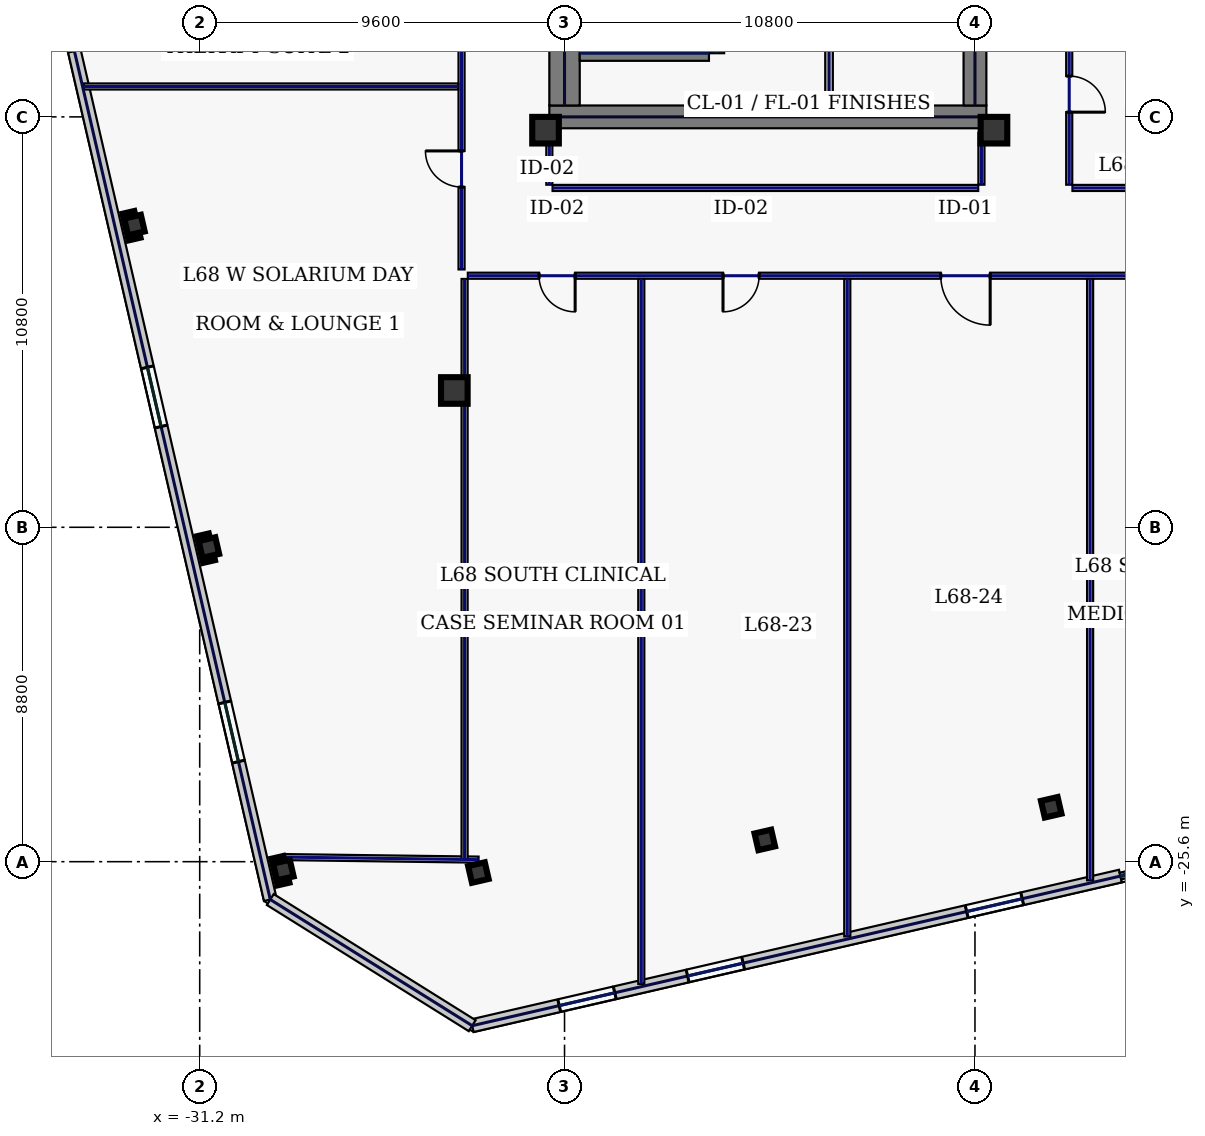
"""IFC4 building model, lengths in metres.
Left out: names, types, materials, properties, quantities, classifications, styles, units other than length and angle.
Written with IfcOpenShell. Run it as: python <this file> out.ifc"""

import sys

from ifc_helpers import new_model, si_unit, direction, frame, frame_2d, origin, origin_2d, place, context, subcontext, project, spatial, rectangle, hollow_rectangle, extrude, element, fill, save


model = new_model("IFC4")
c1 = context("Model", 3, precision=1e-05, world=origin(), true_north=direction((0.0, 1.0)))
c2 = subcontext(c1, "Body", "Model", "MODEL_VIEW")
j1 = project(units=[si_unit("LENGTHUNIT", "METRE"), si_unit("PLANEANGLEUNIT", "RADIAN")], contexts=[c1])
p1 = place(None, origin())
s1 = spatial("IfcSite", under=j1, at=p1, CompositionType="ELEMENT")
p2 = place(p1, origin())
s2 = spatial("IfcBuilding", under=s1, at=p2, CompositionType="ELEMENT")
p3 = place(p2, frame((0.0, 0.0, 293.0)))
s3 = spatial("IfcBuildingStorey", under=s2, at=p3, CompositionType="ELEMENT", Elevation=293.0)
p4 = place(p3, frame((-22.0, -6.0, 0.0), z_axis=(0.0, 0.0, 1.0), x_axis=(1.0, 0.0, 0.0)))
e1 = element("IfcWall", 1, at=p4, inside=s3, PredefinedType="SHEAR", context=c2, shape_type="SweptSolid", body=[
    extrude(rectangle(XDim=11.5, YDim=0.6, at=frame_2d((5.75, 0.0))), origin(), (0.0, 0.0, 1.0), 3.74),
])
p5 = place(p3, frame((-21.6, -5.7, 0.0), z_axis=(0.0, 0.0, 1.0), x_axis=(0.0, 1.0, 0.0)))
e2 = element("IfcWall", 2, at=p5, inside=s3, PredefinedType="SHEAR", context=c2, shape_type="SweptSolid", body=[
    extrude(rectangle(XDim=11.4, YDim=0.8, at=frame_2d((5.7, 0.0))), origin(), (0.0, 0.0, 1.0), 3.74),
])
p6 = place(p3, frame((-10.8, -5.7, 0.0), z_axis=(0.0, 0.0, 1.0), x_axis=(0.0, 1.0, 0.0)))
e3 = element("IfcWall", 3, at=p6, inside=s3, PredefinedType="SHEAR", context=c2, shape_type="SweptSolid", body=[
    extrude(rectangle(XDim=3.05, YDim=0.6, at=frame_2d((1.525, 0.0))), origin(), (0.0, 0.0, 1.0), 3.74),
])
p7 = place(p3, frame((-17.6, -4.325, 0.0), z_axis=(0.0, 0.0, 1.0), x_axis=(0.0, 1.0, 0.0)))
e4 = element("IfcWall", 4, at=p7, inside=s3, PredefinedType="SHEAR", context=c2, shape_type="SweptSolid", body=[
    extrude(rectangle(XDim=8.65, YDim=0.4, at=frame_2d((4.325, 0.0))), origin(), (0.0, 0.0, 1.0), 3.74),
])
p8 = place(p7, frame((0.25, 0.0, 0.0)))
e5 = element("IfcOpeningElement", 5, at=p8, cuts=e4, PredefinedType="OPENING", context=c2, shape_type="SweptSolid", body=[
    extrude(rectangle(XDim=1.1, YDim=2.2, at=frame_2d((0.55, 1.1))), frame((0.0, 0.21, 0.0), z_axis=(0.0, -1.0, 0.0), x_axis=(1.0, 0.0, 0.0)), (0.0, 0.0, 1.0), 0.42),
])
p9 = place(p3, frame((-21.2, -4.325, 0.0), z_axis=(0.0, 0.0, 1.0), x_axis=(1.0, 0.0, 0.0)))
e6 = element("IfcWall", 6, at=p9, inside=s3, PredefinedType="SHEAR", context=c2, shape_type="SweptSolid", body=[
    extrude(rectangle(XDim=3.4, YDim=0.4, at=frame_2d((1.7, 0.0))), origin(), (0.0, 0.0, 1.0), 3.74),
])
for number, where, z_axis, x_axis in (
    (7, (-22.1, -6.35, 0.0), (0.0, 0.0, 1.0), (1.0, 0.0, 0.0)),
    (8, (-10.3, -6.35, 0.0), (0.0, 0.0, 1.0), (1.0, 0.0, 0.0)),
    (9, (-24.5, -13.2, 0.0), (0.0, 0.0, 1.0), (1.0, 0.0, 0.0)),
):
    element("IfcColumn", number, at=place(p3, frame(where, z_axis=z_axis, x_axis=x_axis)), inside=s3, PredefinedType="COLUMN", context=c2, shape_type="SweptSolid", body=[
        extrude(hollow_rectangle(XDim=0.7, YDim=0.7, WallThickness=0.032, at=origin_2d()), origin(), (0.0, 0.0, 1.0), 3.74),
    ])
for number, where, z_axis, x_axis in (
    (10, (-23.867, -25.886, 0.0), (0.0, 0.0, 1.0), (0.974, 0.225, 0.0)),
    (11, (-16.33, -25.027, 0.0), (0.0, 0.0, 1.0), (0.974, 0.225, 0.0)),
    (12, (-8.794, -24.168, 0.0), (0.0, 0.0, 1.0), (0.974, 0.225, 0.0)),
    (13, (-32.917, -8.845, 0.0), (0.0, 0.0, 1.0), (0.974, 0.225, 0.0)),
    (14, (-30.958, -17.332, 0.0), (0.0, 0.0, 1.0), (0.974, 0.225, 0.0)),
    (15, (-28.999, -25.819, 0.0), (0.0, 0.0, 1.0), (0.974, 0.225, 0.0)),
):
    element("IfcColumn", number, at=place(p3, frame(where, z_axis=z_axis, x_axis=x_axis)), inside=s3, PredefinedType="COLUMN", context=c2, shape_type="SweptSolid", body=[
        extrude(hollow_rectangle(XDim=0.45, YDim=0.45, WallThickness=0.022, at=origin_2d()), origin(), (0.0, 0.0, 1.0), 3.74),
    ])
p10 = place(p3, frame((-24.03, -29.916, 0.0), z_axis=(0.0, 0.0, 1.0), x_axis=(0.974370978061, 0.224947098473, 0.0)))
e16 = element("IfcWall", 16, at=p10, inside=s3, PredefinedType="STANDARD", context=c2, shape_type="SweptSolid", body=[
    extrude(rectangle(XDim=17.506, YDim=0.34, at=frame_2d((8.753, 0.0))), origin(), (0.0, 0.0, 1.0), 3.74),
])
p11 = place(p10, frame((2.35, 0.0, 0.9)))
e17 = element("IfcOpeningElement", 17, at=p11, cuts=e16, PredefinedType="OPENING", context=c2, shape_type="SweptSolid", body=[
    extrude(rectangle(XDim=1.5, YDim=2.0, at=frame_2d((0.75, 1.0))), frame((0.0, 0.18, 0.0), z_axis=(0.0, -1.0, 0.0), x_axis=(1.0, 0.0, 0.0)), (0.0, 0.0, 1.0), 0.36),
])
p12 = place(p10, frame((5.817, 0.0, 0.9)))
e18 = element("IfcOpeningElement", 18, at=p12, cuts=e16, PredefinedType="OPENING", context=c2, shape_type="SweptSolid", body=[
    extrude(rectangle(XDim=1.5, YDim=2.0, at=frame_2d((0.75, 1.0))), frame((0.0, 0.18, 0.0), z_axis=(0.0, -1.0, 0.0), x_axis=(1.0, 0.0, 0.0)), (0.0, 0.0, 1.0), 0.36),
])
p13 = place(p10, frame((13.353, 0.0, 0.9)))
e19 = element("IfcOpeningElement", 19, at=p13, cuts=e16, PredefinedType="OPENING", context=c2, shape_type="SweptSolid", body=[
    extrude(rectangle(XDim=1.5, YDim=2.0, at=frame_2d((0.75, 1.0))), frame((0.0, 0.18, 0.0), z_axis=(0.0, -1.0, 0.0), x_axis=(1.0, 0.0, 0.0)), (0.0, 0.0, 1.0), 0.36),
])
p14 = place(p3, frame((-37.486, 8.676, 0.0), z_axis=(0.0, 0.0, 1.0), x_axis=(0.224953091034, -0.974369594576, 0.0)))
e20 = element("IfcWall", 20, at=p14, inside=s3, PredefinedType="STANDARD", context=c2, shape_type="SweptSolid", body=[
    extrude(rectangle(XDim=36.2, YDim=0.34, at=frame_2d((18.1, 0.0))), origin(), (0.0, 0.0, 1.0), 3.74),
])
p15 = place(p14, frame((4.825, 0.0, 0.75)))
e21 = element("IfcOpeningElement", 21, at=p15, cuts=e20, PredefinedType="OPENING", context=c2, shape_type="SweptSolid", body=[
    extrude(rectangle(XDim=0.85, YDim=1.85, at=frame_2d((0.425, 0.925))), frame((0.0, 0.18, 0.0), z_axis=(0.0, -1.0, 0.0), x_axis=(1.0, 0.0, 0.0)), (0.0, 0.0, 1.0), 0.36),
])
p16 = place(p14, frame((12.425, 0.0, 0.75)))
e22 = element("IfcOpeningElement", 22, at=p16, cuts=e20, PredefinedType="OPENING", context=c2, shape_type="SweptSolid", body=[
    extrude(rectangle(XDim=0.85, YDim=1.85, at=frame_2d((0.425, 0.925))), frame((0.0, 0.18, 0.0), z_axis=(0.0, -1.0, 0.0), x_axis=(1.0, 0.0, 0.0)), (0.0, 0.0, 1.0), 0.36),
])
p17 = place(p14, frame((21.825, 0.0, 0.58)))
e23 = element("IfcOpeningElement", 23, at=p17, cuts=e20, PredefinedType="OPENING", context=c2, shape_type="SweptSolid", body=[
    extrude(rectangle(XDim=1.6, YDim=2.3, at=frame_2d((0.8, 1.15))), frame((0.0, 0.18, 0.0), z_axis=(0.0, -1.0, 0.0), x_axis=(1.0, 0.0, 0.0)), (0.0, 0.0, 1.0), 0.36),
])
p18 = place(p14, frame((30.875, 0.0, 0.58)))
e24 = element("IfcOpeningElement", 24, at=p18, cuts=e20, PredefinedType="OPENING", context=c2, shape_type="SweptSolid", body=[
    extrude(rectangle(XDim=1.6, YDim=2.3, at=frame_2d((0.8, 1.15))), frame((0.0, 0.18, 0.0), z_axis=(0.0, -1.0, 0.0), x_axis=(1.0, 0.0, 0.0)), (0.0, 0.0, 1.0), 0.36),
])
p19 = place(p3, frame((-29.343, -26.596, 0.0), z_axis=(0.0, 0.0, 1.0), x_axis=(0.848037708252, -0.529935887993, 0.0)))
e25 = element("IfcWall", 25, at=p19, inside=s3, PredefinedType="STANDARD", context=c2, shape_type="SweptSolid", body=[
    extrude(rectangle(XDim=6.265, YDim=0.34, at=frame_2d((3.133, 0.0))), origin(), (0.0, 0.0, 1.0), 3.74),
])
p20 = place(p3, frame((-14.64, -5.56, 0.0), z_axis=(0.0, 0.0, 1.0), x_axis=(0.0, 1.0, 0.0)))
e26 = element("IfcWall", 26, at=p20, inside=s3, PredefinedType="SOLIDWALL", context=c2, shape_type="SweptSolid", body=[
    extrude(rectangle(XDim=5.6, YDim=0.2, at=frame_2d((2.8, 0.0))), origin(), (0.0, 0.0, 1.0), 3.74),
])
p21 = place(p20, frame((3.51, 0.0, 0.0)))
e27 = element("IfcOpeningElement", 27, at=p21, cuts=e26, PredefinedType="OPENING", context=c2, shape_type="SweptSolid", body=[
    extrude(rectangle(XDim=1.2, YDim=2.2, at=frame_2d((0.6, 1.1))), frame((0.0, 0.11, 0.0), z_axis=(0.0, -1.0, 0.0), x_axis=(1.0, 0.0, 0.0)), (0.0, 0.0, 1.0), 0.22),
])
p22 = place(p3, frame((-28.994, -25.479, 0.0), z_axis=(0.0, 0.0, 1.0), x_axis=(0.999915052546, -0.01303409726, 0.0)))
e28 = element("IfcWall", 28, at=p22, inside=s3, PredefinedType="PARTITIONING", context=c2, shape_type="SweptSolid", body=[
    extrude(rectangle(XDim=5.132, YDim=0.16, at=frame_2d((2.566, 0.0))), origin(), (0.0, 0.0, 1.0), 3.74),
])
p23 = place(p3, frame((-24.31, -10.015, 0.0), z_axis=(0.0, 0.0, 1.0), x_axis=(0.0, 1.0, 0.0)))
e29 = element("IfcWall", 29, at=p23, inside=s3, PredefinedType="PARTITIONING", context=c2, shape_type="SweptSolid", body=[
    extrude(rectangle(XDim=20.13, YDim=0.16, at=frame_2d((10.065, 0.0))), origin(), (0.0, 0.0, 1.0), 3.74),
])
p24 = place(p23, frame((2.169, 0.0, 0.0)))
e30 = element("IfcOpeningElement", 30, at=p24, cuts=e29, PredefinedType="OPENING", context=c2, shape_type="SweptSolid", body=[
    extrude(rectangle(XDim=0.95, YDim=2.2, at=frame_2d((0.475, 1.1))), frame((0.0, 0.09, 0.0), z_axis=(0.0, -1.0, 0.0), x_axis=(1.0, 0.0, 0.0)), (0.0, 0.0, 1.0), 0.18),
])
p25 = place(p23, frame((6.4, 0.0, 0.0)))
e31 = element("IfcOpeningElement", 31, at=p25, cuts=e29, PredefinedType="OPENING", context=c2, shape_type="SweptSolid", body=[
    extrude(rectangle(XDim=0.95, YDim=2.2, at=frame_2d((0.475, 1.1))), frame((0.0, 0.09, 0.0), z_axis=(0.0, -1.0, 0.0), x_axis=(1.0, 0.0, 0.0)), (0.0, 0.0, 1.0), 0.18),
])
p26 = place(p23, frame((11.6, 0.0, 0.0)))
e32 = element("IfcOpeningElement", 32, at=p26, cuts=e29, PredefinedType="OPENING", context=c2, shape_type="SweptSolid", body=[
    extrude(rectangle(XDim=0.95, YDim=2.2, at=frame_2d((0.475, 1.1))), frame((0.0, 0.09, 0.0), z_axis=(0.0, -1.0, 0.0), x_axis=(1.0, 0.0, 0.0)), (0.0, 0.0, 1.0), 0.18),
])
p27 = place(p23, frame((17.131, 0.0, 0.0)))
e33 = element("IfcOpeningElement", 33, at=p27, cuts=e29, PredefinedType="OPENING", context=c2, shape_type="SweptSolid", body=[
    extrude(rectangle(XDim=0.95, YDim=2.2, at=frame_2d((0.475, 1.1))), frame((0.0, 0.09, 0.0), z_axis=(0.0, -1.0, 0.0), x_axis=(1.0, 0.0, 0.0)), (0.0, 0.0, 1.0), 0.18),
])
p28 = place(p3, frame((12.535, -10.18, 0.0), z_axis=(0.0, 0.0, 1.0), x_axis=(-1.0, 0.0, 0.0)))
e34 = element("IfcWall", 34, at=p28, inside=s3, PredefinedType="PARTITIONING", context=c2, shape_type="SweptSolid", body=[
    extrude(rectangle(XDim=36.68, YDim=0.16, at=frame_2d((18.34, 0.0))), origin(), (0.0, 0.0, 1.0), 3.74),
])
p29 = place(p28, frame((33.856, 0.0, 0.0)))
e35 = element("IfcOpeningElement", 35, at=p29, cuts=e34, PredefinedType="OPENING", context=c2, shape_type="SweptSolid", body=[
    extrude(rectangle(XDim=0.95, YDim=2.2, at=frame_2d((0.475, 1.1))), frame((0.0, 0.09, 0.0), z_axis=(0.0, -1.0, 0.0), x_axis=(1.0, 0.0, 0.0)), (0.0, 0.0, 1.0), 0.18),
])
p30 = place(p28, frame((29.015, 0.0, 0.0)))
e36 = element("IfcOpeningElement", 36, at=p30, cuts=e34, PredefinedType="OPENING", context=c2, shape_type="SweptSolid", body=[
    extrude(rectangle(XDim=0.95, YDim=2.2, at=frame_2d((0.475, 1.1))), frame((0.0, 0.09, 0.0), z_axis=(0.0, -1.0, 0.0), x_axis=(1.0, 0.0, 0.0)), (0.0, 0.0, 1.0), 0.18),
])
p31 = place(p28, frame((22.935, 0.0, 0.0)))
e37 = element("IfcOpeningElement", 37, at=p31, cuts=e34, PredefinedType="OPENING", context=c2, shape_type="SweptSolid", body=[
    extrude(rectangle(XDim=1.3, YDim=2.2, at=frame_2d((0.65, 1.1))), frame((0.0, 0.09, 0.0), z_axis=(0.0, -1.0, 0.0), x_axis=(1.0, 0.0, 0.0)), (0.0, 0.0, 1.0), 0.18),
])
p32 = place(p28, frame((17.555, 0.0, 0.0)))
e38 = element("IfcOpeningElement", 38, at=p32, cuts=e34, PredefinedType="OPENING", context=c2, shape_type="SweptSolid", body=[
    extrude(rectangle(XDim=1.3, YDim=2.2, at=frame_2d((0.65, 1.1))), frame((0.0, 0.09, 0.0), z_axis=(0.0, -1.0, 0.0), x_axis=(1.0, 0.0, 0.0)), (0.0, 0.0, 1.0), 0.18),
])
p33 = place(p28, frame((9.97, 0.0, 0.0)))
e39 = element("IfcOpeningElement", 39, at=p33, cuts=e34, PredefinedType="OPENING", context=c2, shape_type="SweptSolid", body=[
    extrude(rectangle(XDim=1.3, YDim=2.2, at=frame_2d((0.65, 1.1))), frame((0.0, 0.09, 0.0), z_axis=(0.0, -1.0, 0.0), x_axis=(1.0, 0.0, 0.0)), (0.0, 0.0, 1.0), 0.18),
])
p34 = place(p28, frame((2.329, 0.0, 0.0)))
e40 = element("IfcOpeningElement", 40, at=p34, cuts=e34, PredefinedType="OPENING", context=c2, shape_type="SweptSolid", body=[
    extrude(rectangle(XDim=0.95, YDim=2.2, at=frame_2d((0.475, 1.1))), frame((0.0, 0.09, 0.0), z_axis=(0.0, -1.0, 0.0), x_axis=(1.0, 0.0, 0.0)), (0.0, 0.0, 1.0), 0.18),
])
p35 = place(p3, frame((-8.32, 7.885, 0.0), z_axis=(0.0, 0.0, 1.0), x_axis=(0.0, -1.0, 0.0)))
e41 = element("IfcWall", 41, at=p35, inside=s3, PredefinedType="PARTITIONING", context=c2, shape_type="SweptSolid", body=[
    extrude(rectangle(XDim=15.67, YDim=0.16, at=frame_2d((7.835, 0.0))), origin(), (0.0, 0.0, 1.0), 3.74),
])
p36 = place(p35, frame((12.811, 0.0, 0.0)))
e42 = element("IfcOpeningElement", 42, at=p36, cuts=e41, PredefinedType="OPENING", context=c2, shape_type="SweptSolid", body=[
    extrude(rectangle(XDim=0.95, YDim=2.2, at=frame_2d((0.475, 1.1))), frame((0.0, 0.09, 0.0), z_axis=(0.0, -1.0, 0.0), x_axis=(1.0, 0.0, 0.0)), (0.0, 0.0, 1.0), 0.18),
])
p37 = place(p35, frame((5.579, 0.0, 0.0)))
e43 = element("IfcOpeningElement", 43, at=p37, cuts=e41, PredefinedType="OPENING", context=c2, shape_type="SweptSolid", body=[
    extrude(rectangle(XDim=0.95, YDim=2.2, at=frame_2d((0.475, 1.1))), frame((0.0, 0.09, 0.0), z_axis=(0.0, -1.0, 0.0), x_axis=(1.0, 0.0, 0.0)), (0.0, 0.0, 1.0), 0.18),
])
p38 = place(p3, frame((-8.235, -7.87, 0.0), z_axis=(0.0, 0.0, 1.0), x_axis=(1.0, 0.0, 0.0)))
e44 = element("IfcWall", 44, at=p38, inside=s3, PredefinedType="PARTITIONING", context=c2, shape_type="SweptSolid", body=[
    extrude(rectangle(XDim=4.27, YDim=0.16, at=frame_2d((2.135, 0.0))), origin(), (0.0, 0.0, 1.0), 3.74),
])
for number, where, z_axis, x_axis in (
    (45, (-10.63, -7.785, 0.0), (0.0, 0.0, 1.0), (0.0, 1.0, 0.0)),
    (46, (-22.0, -6.42, 0.0), (0.0, 0.0, 1.0), (0.0, -1.0, 0.0)),
):
    element("IfcWall", number, at=place(p3, frame(where, z_axis=z_axis, x_axis=x_axis)), inside=s3, PredefinedType="PARTITIONING", context=c2, shape_type="SweptSolid", body=[
        extrude(rectangle(XDim=1.365, YDim=0.16, at=frame_2d((0.683, 0.0))), origin(), (0.0, 0.0, 1.0), 3.74),
    ])
p39 = place(p3, frame((-21.915, -7.87, 0.0), z_axis=(0.0, 0.0, 1.0), x_axis=(1.0, 0.0, 0.0)))
e47 = element("IfcWall", 47, at=p39, inside=s3, PredefinedType="PARTITIONING", context=c2, shape_type="SweptSolid", body=[
    extrude(rectangle(XDim=11.2, YDim=0.16, at=frame_2d((5.6, 0.0))), origin(), (0.0, 0.0, 1.0), 3.74),
])
p40 = place(p3, frame((-24.23, -25.536, 0.0), z_axis=(0.0, 0.0, 1.0), x_axis=(0.0, 1.0, 0.0)))
e48 = element("IfcWall", 48, at=p40, inside=s3, PredefinedType="PARTITIONING", context=c2, shape_type="SweptSolid", body=[
    extrude(rectangle(XDim=15.271, YDim=0.16, at=frame_2d((7.635, 0.0))), origin(), (0.0, 0.0, 1.0), 3.335),
])
p41 = place(p3, frame((-19.58, -28.817, 0.0), z_axis=(0.0, 0.0, 1.0), x_axis=(0.0, 1.0, 0.0)))
e49 = element("IfcWall", 49, at=p41, inside=s3, PredefinedType="PARTITIONING", context=c2, shape_type="SweptSolid", body=[
    extrude(rectangle(XDim=18.552, YDim=0.16, at=frame_2d((9.276, 0.0))), origin(), (0.0, 0.0, 1.0), 3.74),
])
p42 = place(p3, frame((-14.16, -27.566, 0.0), z_axis=(0.0, 0.0, 1.0), x_axis=(0.0, 1.0, 0.0)))
e50 = element("IfcWall", 50, at=p42, inside=s3, PredefinedType="PARTITIONING", context=c2, shape_type="SweptSolid", body=[
    extrude(rectangle(XDim=17.301, YDim=0.16, at=frame_2d((8.65, 0.0))), origin(), (0.0, 0.0, 1.0), 3.74),
])
p43 = place(p3, frame((-7.77, -26.091, 0.0), z_axis=(0.0, 0.0, 1.0), x_axis=(0.0, 1.0, 0.0)))
e51 = element("IfcWall", 51, at=p43, inside=s3, PredefinedType="PARTITIONING", context=c2, shape_type="SweptSolid", body=[
    extrude(rectangle(XDim=15.826, YDim=0.16, at=frame_2d((7.913, 0.0))), origin(), (0.0, 0.0, 1.0), 3.74),
])
p44 = place(p3, frame((-34.262, -5.2, 0.0), z_axis=(0.0, 0.0, 1.0), x_axis=(1.0, 0.0, 0.0)))
e52 = element("IfcWall", 52, at=p44, inside=s3, PredefinedType="PARTITIONING", context=c2, shape_type="SweptSolid", body=[
    extrude(rectangle(XDim=9.867, YDim=0.16, at=frame_2d((4.933, 0.0))), origin(), (0.0, 0.0, 1.0), 3.74),
])
p45 = place(p11, origin())
e53 = element("IfcWindow", 53, at=p45, inside=s3, PartitioningType="SINGLE_PANEL", PredefinedType="WINDOW", context=c2, shape_type="SweptSolid", body=[
    extrude(rectangle(XDim=1.5, YDim=2.0, at=frame_2d((0.75, 1.0))), frame((0.0, 0.03, 0.0), z_axis=(0.0, -1.0, 0.0), x_axis=(1.0, 0.0, 0.0)), (0.0, 0.0, 1.0), 0.06),
])
fill(e17, e53)
p46 = place(p12, origin())
e54 = element("IfcWindow", 54, at=p46, inside=s3, PartitioningType="SINGLE_PANEL", PredefinedType="WINDOW", context=c2, shape_type="SweptSolid", body=[
    extrude(rectangle(XDim=1.5, YDim=2.0, at=frame_2d((0.75, 1.0))), frame((0.0, 0.03, 0.0), z_axis=(0.0, -1.0, 0.0), x_axis=(1.0, 0.0, 0.0)), (0.0, 0.0, 1.0), 0.06),
])
fill(e18, e54)
p47 = place(p13, origin())
e55 = element("IfcWindow", 55, at=p47, inside=s3, PartitioningType="SINGLE_PANEL", PredefinedType="WINDOW", context=c2, shape_type="SweptSolid", body=[
    extrude(rectangle(XDim=1.5, YDim=2.0, at=frame_2d((0.75, 1.0))), frame((0.0, 0.03, 0.0), z_axis=(0.0, -1.0, 0.0), x_axis=(1.0, 0.0, 0.0)), (0.0, 0.0, 1.0), 0.06),
])
fill(e19, e55)
p48 = place(p17, origin())
e56 = element("IfcWindow", 56, at=p48, inside=s3, PartitioningType="SINGLE_PANEL", PredefinedType="WINDOW", context=c2, shape_type="SweptSolid", body=[
    extrude(rectangle(XDim=1.6, YDim=2.3, at=frame_2d((0.8, 1.15))), frame((0.0, 0.03, 0.0), z_axis=(0.0, -1.0, 0.0), x_axis=(1.0, 0.0, 0.0)), (0.0, 0.0, 1.0), 0.06),
])
fill(e23, e56)
p49 = place(p18, origin())
e57 = element("IfcWindow", 57, at=p49, inside=s3, PartitioningType="SINGLE_PANEL", PredefinedType="WINDOW", context=c2, shape_type="SweptSolid", body=[
    extrude(rectangle(XDim=1.6, YDim=2.3, at=frame_2d((0.8, 1.15))), frame((0.0, 0.03, 0.0), z_axis=(0.0, -1.0, 0.0), x_axis=(1.0, 0.0, 0.0)), (0.0, 0.0, 1.0), 0.06),
])
fill(e24, e57)
p50 = place(p29, origin())
e58 = element("IfcDoor", 58, at=p50, inside=s3, OperationType="SINGLE_SWING_LEFT", PredefinedType="DOOR", context=c2, shape_type="SweptSolid", body=[
    extrude(rectangle(XDim=0.95, YDim=2.2, at=frame_2d((0.475, 1.1))), frame((0.0, 0.025, 0.0), z_axis=(0.0, -1.0, 0.0), x_axis=(1.0, 0.0, 0.0)), (0.0, 0.0, 1.0), 0.05),
])
fill(e35, e58)
p51 = place(p30, origin())
e59 = element("IfcDoor", 59, at=p51, inside=s3, OperationType="SINGLE_SWING_RIGHT", PredefinedType="DOOR", context=c2, shape_type="SweptSolid", body=[
    extrude(rectangle(XDim=0.95, YDim=2.2, at=frame_2d((0.475, 1.1))), frame((0.0, 0.025, 0.0), z_axis=(0.0, -1.0, 0.0), x_axis=(1.0, 0.0, 0.0)), (0.0, 0.0, 1.0), 0.05),
])
fill(e36, e59)
p52 = place(p31, origin())
e60 = element("IfcDoor", 60, at=p52, inside=s3, OperationType="SINGLE_SWING_LEFT", PredefinedType="DOOR", context=c2, shape_type="SweptSolid", body=[
    extrude(rectangle(XDim=1.3, YDim=2.2, at=frame_2d((0.65, 1.1))), frame((0.0, 0.025, 0.0), z_axis=(0.0, -1.0, 0.0), x_axis=(1.0, 0.0, 0.0)), (0.0, 0.0, 1.0), 0.05),
])
fill(e37, e60)
p53 = place(p24, origin())
e61 = element("IfcDoor", 61, at=p53, inside=s3, OperationType="SINGLE_SWING_RIGHT", PredefinedType="DOOR", context=c2, shape_type="SweptSolid", body=[
    extrude(rectangle(XDim=0.95, YDim=2.2, at=frame_2d((0.475, 1.1))), frame((0.0, 0.025, 0.0), z_axis=(0.0, -1.0, 0.0), x_axis=(1.0, 0.0, 0.0)), (0.0, 0.0, 1.0), 0.05),
])
fill(e30, e61)
p54 = place(p36, origin())
e62 = element("IfcDoor", 62, at=p54, inside=s3, OperationType="SINGLE_SWING_RIGHT", PredefinedType="DOOR", context=c2, shape_type="SweptSolid", body=[
    extrude(rectangle(XDim=0.95, YDim=2.2, at=frame_2d((0.475, 1.1))), frame((0.0, 0.025, 0.0), z_axis=(0.0, -1.0, 0.0), x_axis=(1.0, 0.0, 0.0)), (0.0, 0.0, 1.0), 0.05),
])
fill(e42, e62)
save(model, sys.argv[1])
